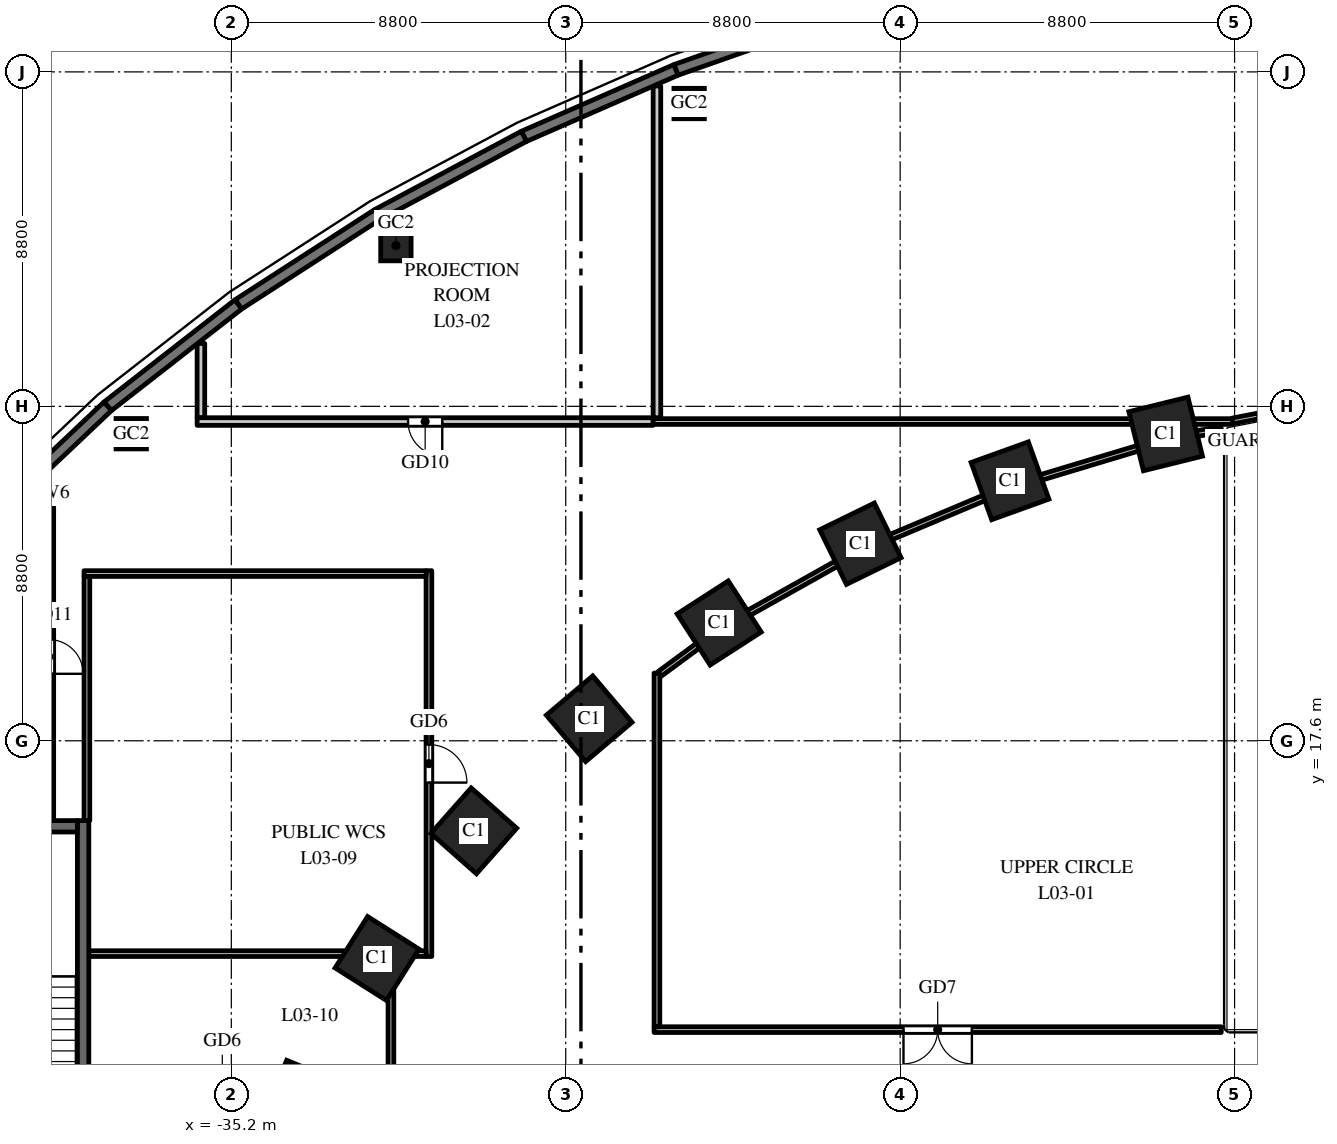
"""IFC4 building model, lengths in metres.
Left out: names, types, materials, properties, quantities, classifications, styles, units other than length and angle.
Written with IfcOpenShell. Run it as: python <this file> out.ifc"""

import sys

from ifc_helpers import new_model, si_unit, direction, frame, frame_2d, origin, origin_2d, place, context, subcontext, project, spatial, rectangle, hollow_rectangle, extrude, element, fill, save


model = new_model("IFC4")
c1 = context("Model", 3, precision=1e-05, world=origin(), true_north=direction((0.0, 1.0)))
c2 = subcontext(c1, "Body", "Model", "MODEL_VIEW")
j1 = project(units=[si_unit("LENGTHUNIT", "METRE"), si_unit("PLANEANGLEUNIT", "RADIAN")], contexts=[c1])
p1 = place(None, origin())
s1 = spatial("IfcSite", under=j1, at=p1, CompositionType="ELEMENT")
p2 = place(p1, origin())
s2 = spatial("IfcBuilding", under=s1, at=p2, CompositionType="ELEMENT")
p3 = place(p2, frame((0.0, 0.0, 19.5)))
s3 = spatial("IfcBuildingStorey", under=s2, at=p3, CompositionType="ELEMENT", Elevation=19.5)
for number, where, z_axis, x_axis in (
    (1, (-10.613, 25.674, 0.0), (0.0, 0.0, 1.0), (-0.971, -0.24, 0.0)),
    (2, (-14.709, 24.441, 0.0), (0.0, 0.0, 1.0), (-0.941, -0.338, 0.0)),
    (3, (-18.646, 22.785, 0.0), (0.0, 0.0, 1.0), (-0.898, -0.439, 0.0)),
    (4, (-22.362, 20.7, 0.0), (0.0, 0.0, 1.0), (-0.84, -0.542, 0.0)),
    (5, (-25.783, 18.18, 0.0), (0.0, 0.0, 1.0), (-0.763, -0.646, 0.0)),
    (6, (-28.819, 15.23, 0.0), (0.0, 0.0, 1.0), (-0.663, -0.749, 0.0)),
    (7, (-31.365, 11.871, 0.0), (0.0, 0.0, 1.0), (-0.535, -0.845, 0.0)),
    (8, (-33.305, 8.149, 0.0), (0.0, 0.0, 1.0), (-0.379, -0.925, 0.0)),
):
    element("IfcColumn", number, at=place(p3, frame(where, z_axis=z_axis, x_axis=x_axis)), inside=s3, PredefinedType="COLUMN", context=c2, shape_type="SweptSolid", body=[
        extrude(rectangle(XDim=1.6, YDim=1.6, at=origin_2d()), origin(), (0.0, 0.0, 1.0), 5.5),
    ])
for number, where, z_axis, x_axis in (
    (9, (-23.153, 34.368, 0.0), (0.0, 0.0, 1.0), (1.0, 0.0, 0.0)),
    (10, (-30.869, 30.629, 0.0), (0.0, 0.0, 1.0), (1.0, 0.0, 0.0)),
    (11, (-37.833, 25.68, 0.0), (0.0, 0.0, 1.0), (1.0, 0.0, 0.0)),
):
    element("IfcColumn", number, at=place(p3, frame(where, z_axis=z_axis, x_axis=x_axis)), inside=s3, PredefinedType="COLUMN", context=c2, shape_type="SweptSolid", body=[
        extrude(hollow_rectangle(XDim=0.8, YDim=0.8, WallThickness=0.04, at=origin_2d()), origin(), (0.0, 0.0, 1.0), 5.5),
    ])
p4 = place(p3, frame((-22.346, 20.537, 0.0), z_axis=(0.0, 0.0, 1.0), x_axis=(0.872066959566, 0.489386573204, 0.0)))
e12 = element("IfcWall", 12, at=p4, inside=s3, PredefinedType="PARTITIONING", context=c2, shape_type="SweptSolid", body=[
    extrude(rectangle(XDim=4.242, YDim=0.15, at=frame_2d((2.121, 0.0))), origin(), (0.0, 0.0, 1.0), 4.35),
])
p5 = place(p3, frame((-18.649, 22.621, 0.0), z_axis=(0.0, 0.0, 1.0), x_axis=(0.921813560734, 0.387633537309, 0.0)))
e13 = element("IfcWall", 13, at=p5, inside=s3, PredefinedType="PARTITIONING", context=c2, shape_type="SweptSolid", body=[
    extrude(rectangle(XDim=4.253, YDim=0.15, at=frame_2d((2.126, 0.0))), origin(), (0.0, 0.0, 1.0), 4.35),
])
p6 = place(p3, frame((-14.73, 24.278, 0.0), z_axis=(0.0, 0.0, 1.0), x_axis=(0.957579221601, 0.288170148278, 0.0)))
e14 = element("IfcWall", 14, at=p6, inside=s3, PredefinedType="PARTITIONING", context=c2, shape_type="SweptSolid", body=[
    extrude(rectangle(XDim=4.412, YDim=0.15, at=frame_2d((2.206, 0.0))), origin(), (0.0, 0.0, 1.0), 4.35),
])
p7 = place(p3, frame((-10.503, 25.542, 0.0), z_axis=(0.0, 0.0, 1.0), x_axis=(0.981596023088, 0.190969231707, 0.0)))
e15 = element("IfcWall", 15, at=p7, inside=s3, PredefinedType="PARTITIONING", context=c2, shape_type="SweptSolid", body=[
    extrude(rectangle(XDim=1.378, YDim=0.15, at=frame_2d((0.689, 0.0))), origin(), (0.0, 0.0, 1.0), 4.35),
])
p8 = place(p3, frame((-9.15, 10.0, 0.0), z_axis=(0.0, 0.0, 1.0), x_axis=(-1.0, 0.0, 0.0)))
e16 = element("IfcWall", 16, at=p8, inside=s3, PredefinedType="PARTITIONING", context=c2, shape_type="SweptSolid", body=[
    extrude(rectangle(XDim=14.925, YDim=0.15, at=frame_2d((7.462, 0.0))), origin(), (0.0, 0.0, 1.0), 4.2),
])
p9 = place(p8, frame((6.562, 0.0, 0.0)))
e17 = element("IfcOpeningElement", 17, at=p9, cuts=e16, PredefinedType="OPENING", context=c2, shape_type="SweptSolid", body=[
    extrude(rectangle(XDim=1.8, YDim=2.4, at=frame_2d((0.9, 1.2))), frame((0.0, 0.085, 0.0), z_axis=(0.0, -1.0, 0.0), x_axis=(1.0, 0.0, 0.0)), (0.0, 0.0, 1.0), 0.17),
])
p10 = place(p3, frame((-24.0, 10.075, 0.0), z_axis=(0.0, 0.0, 1.0), x_axis=(0.0, 1.0, 0.0)))
e18 = element("IfcWall", 18, at=p10, inside=s3, PredefinedType="PARTITIONING", context=c2, shape_type="SweptSolid", body=[
    extrude(rectangle(XDim=9.307, YDim=0.15, at=frame_2d((4.654, 0.0))), origin(), (0.0, 0.0, 1.0), 4.2),
])
p11 = place(p3, frame((-23.927, 19.361, 0.0), z_axis=(0.0, 0.0, 1.0), x_axis=(0.805121312462, 0.593110168703, 0.0)))
e19 = element("IfcWall", 19, at=p11, inside=s3, PredefinedType="PARTITIONING", context=c2, shape_type="SweptSolid", body=[
    extrude(rectangle(XDim=1.968, YDim=0.15, at=frame_2d((0.984, 0.0))), origin(), (0.0, 0.0, 1.0), 4.35),
])
p12 = place(p3, frame((-24.0, 34.83, 0.0), z_axis=(0.0, 0.0, 1.0), x_axis=(0.0, -1.0, 0.0)))
e20 = element("IfcWall", 20, at=p12, inside=s3, PredefinedType="PARTITIONING", context=c2, shape_type="SweptSolid", body=[
    extrude(rectangle(XDim=8.73, YDim=0.2, at=frame_2d((4.365, 0.0))), origin(), (0.0, 0.0, 1.0), 4.65),
])
p13 = place(p3, frame((-36.0, 26.1, 0.0), z_axis=(0.0, 0.0, 1.0), x_axis=(0.0, 1.0, 0.0)))
e21 = element("IfcWall", 21, at=p13, inside=s3, PredefinedType="PARTITIONING", context=c2, shape_type="SweptSolid", body=[
    extrude(rectangle(XDim=1.954, YDim=0.2, at=frame_2d((0.977, 0.0))), origin(), (0.0, 0.0, 1.0), 4.65),
])
p14 = place(p3, frame((-24.099, 26.0, 0.0), z_axis=(0.0, 0.0, 1.0), x_axis=(-1.0, 0.0, 0.0)))
e22 = element("IfcWall", 22, at=p14, inside=s3, PredefinedType="PARTITIONING", context=c2, shape_type="SweptSolid", body=[
    extrude(rectangle(XDim=12.001, YDim=0.2, at=frame_2d((6.001, 0.0))), origin(), (0.0, 0.0, 1.0), 4.25),
])
p15 = place(p14, frame((5.551, 0.0, 0.0)))
e23 = element("IfcOpeningElement", 23, at=p15, cuts=e22, PredefinedType="OPENING", context=c2, shape_type="SweptSolid", body=[
    extrude(rectangle(XDim=0.9, YDim=2.1, at=frame_2d((0.45, 1.05))), frame((0.0, 0.11, 0.0), z_axis=(0.0, -1.0, 0.0), x_axis=(1.0, 0.0, 0.0)), (0.0, 0.0, 1.0), 0.22),
])
p16 = place(p3, frame((-8.163, 26.15, 0.0), z_axis=(0.0, 0.0, 1.0), x_axis=(-0.981654917387, -0.190666261224, 0.0)))
e24 = element("IfcWall", 24, at=p16, inside=s3, PredefinedType="PARTITIONING", context=c2, shape_type="SweptSolid", body=[
    extrude(rectangle(XDim=0.707, YDim=0.15, at=frame_2d((0.354, 0.0))), origin(), (0.0, 0.0, 1.0), 4.35),
])
p17 = place(p3, frame((-8.859, 26.0, 0.0), z_axis=(0.0, 0.0, 1.0), x_axis=(-1.0, 0.0, 0.0)))
e25 = element("IfcWall", 25, at=p17, inside=s3, PredefinedType="PARTITIONING", context=c2, shape_type="SweptSolid", body=[
    extrude(rectangle(XDim=15.241, YDim=0.15, at=frame_2d((7.621, 0.0))), origin(), (0.0, 0.0, 1.0), 4.25),
])
p18 = place(p3, frame((-40.0, 24.125, 0.0), z_axis=(0.0, 0.0, 1.0), x_axis=(0.0, -1.0, 0.0)))
e26 = element("IfcWall", 26, at=p18, inside=s3, PredefinedType="PARTITIONING", context=c2, shape_type="SweptSolid", body=[
    extrude(rectangle(XDim=8.625, YDim=0.25, at=frame_2d((4.312, 0.0))), origin(), (0.0, 0.0, 1.0), 4.25),
])
p19 = place(p18, frame((3.863, 0.0, 0.0)))
e27 = element("IfcOpeningElement", 27, at=p19, cuts=e26, PredefinedType="OPENING", context=c2, shape_type="SweptSolid", body=[
    extrude(rectangle(XDim=0.9, YDim=2.1, at=frame_2d((0.45, 1.05))), frame((0.0, 0.135, 0.0), z_axis=(0.0, -1.0, 0.0), x_axis=(1.0, 0.0, 0.0)), (0.0, 0.0, 1.0), 0.27),
])
p20 = place(p3, frame((-31.065, 12.0, 0.0), z_axis=(0.0, 0.0, 1.0), x_axis=(-1.0, 0.0, 0.0)))
e28 = element("IfcWall", 28, at=p20, inside=s3, PredefinedType="PARTITIONING", context=c2, shape_type="SweptSolid", body=[
    extrude(rectangle(XDim=7.885, YDim=0.15, at=frame_2d((3.942, 0.0))), origin(), (0.0, 0.0, 1.0), 5.25),
])
p21 = place(p3, frame((-30.0, 22.075, 0.0), z_axis=(0.0, 0.0, 1.0), x_axis=(0.0, -1.0, 0.0)))
e29 = element("IfcWall", 29, at=p21, inside=s3, PredefinedType="PARTITIONING", context=c2, shape_type="SweptSolid", body=[
    extrude(rectangle(XDim=10.15, YDim=0.15, at=frame_2d((5.075, 0.0))), origin(), (0.0, 0.0, 1.0), 4.25),
])
p22 = place(p21, frame((4.575, 0.0, 0.0)))
e30 = element("IfcOpeningElement", 30, at=p22, cuts=e29, PredefinedType="OPENING", context=c2, shape_type="SweptSolid", body=[
    extrude(rectangle(XDim=1.0, YDim=2.1, at=frame_2d((0.5, 1.05))), frame((0.0, 0.085, 0.0), z_axis=(0.0, -1.0, 0.0), x_axis=(1.0, 0.0, 0.0)), (0.0, 0.0, 1.0), 0.17),
])
p23 = place(p3, frame((-30.075, 12.0, 0.0), z_axis=(0.0, 0.0, 1.0), x_axis=(-1.0, 0.0, 0.0)))
e31 = element("IfcWall", 31, at=p23, inside=s3, PredefinedType="PARTITIONING", context=c2, shape_type="SweptSolid", body=[
    extrude(rectangle(XDim=0.86, YDim=0.15, at=frame_2d((0.43, 0.0))), origin(), (0.0, 0.0, 1.0), 5.25),
])
p24 = place(p3, frame((-39.0, 15.5, 0.0), z_axis=(0.0, 0.0, 1.0), x_axis=(0.0, 1.0, 0.0)))
e32 = element("IfcWall", 32, at=p24, inside=s3, PredefinedType="PARTITIONING", context=c2, shape_type="SweptSolid", body=[
    extrude(rectangle(XDim=6.425, YDim=0.15, at=frame_2d((3.212, 0.0))), origin(), (0.0, 0.0, 1.0), 4.25),
])
p25 = place(p3, frame((-39.075, 22.0, 0.0), z_axis=(0.0, 0.0, 1.0), x_axis=(1.0, 0.0, 0.0)))
e33 = element("IfcWall", 33, at=p25, inside=s3, PredefinedType="PARTITIONING", context=c2, shape_type="SweptSolid", body=[
    extrude(rectangle(XDim=9.0, YDim=0.15, at=frame_2d((4.5, 0.0))), origin(), (0.0, 0.0, 1.0), 4.25),
])
p26 = place(p3, frame((-31.0, 11.925, 0.0), z_axis=(0.0, 0.0, 1.0), x_axis=(0.0, -1.0, 0.0)))
e34 = element("IfcWall", 34, at=p26, inside=s3, PredefinedType="PARTITIONING", context=c2, shape_type="SweptSolid", body=[
    extrude(rectangle(XDim=3.25, YDim=0.15, at=frame_2d((1.625, 0.0))), origin(), (0.0, 0.0, 1.0), 5.25),
])
p27 = place(p3, frame((-19.379, 36.699, 0.0), z_axis=(0.0, 0.0, 1.0), x_axis=(-0.943526738033, -0.331296384853, 0.0)))
e35 = element("IfcWall", 35, at=p27, inside=s3, PredefinedType="SOLIDWALL", context=c2, shape_type="SweptSolid", body=[
    extrude(rectangle(XDim=4.368, YDim=0.3, at=frame_2d((2.184, 0.0))), origin(), (0.0, 0.0, 1.0), 5.25),
])
p28 = place(p27, frame((0.984, 0.0, 1.0)))
e36 = element("IfcOpeningElement", 36, at=p28, cuts=e35, PredefinedType="OPENING", context=c2, shape_type="SweptSolid", body=[
    extrude(rectangle(XDim=2.4, YDim=3.0, at=frame_2d((1.2, 1.5))), frame((0.0, 0.16, 0.0), z_axis=(0.0, -1.0, 0.0), x_axis=(1.0, 0.0, 0.0)), (0.0, 0.0, 1.0), 0.32),
])
p29 = place(p3, frame((-23.5, 35.252, 0.0), z_axis=(0.0, 0.0, 1.0), x_axis=(-0.916336904548, -0.400408138483, 0.0)))
e37 = element("IfcWall", 37, at=p29, inside=s3, PredefinedType="SOLIDWALL", context=c2, shape_type="SweptSolid", body=[
    extrude(rectangle(XDim=4.366, YDim=0.3, at=frame_2d((2.183, 0.0))), origin(), (0.0, 0.0, 1.0), 5.25),
])
p30 = place(p29, frame((0.983, 0.0, 1.0)))
e38 = element("IfcOpeningElement", 38, at=p30, cuts=e37, PredefinedType="OPENING", context=c2, shape_type="SweptSolid", body=[
    extrude(rectangle(XDim=2.4, YDim=3.0, at=frame_2d((1.2, 1.5))), frame((0.0, 0.16, 0.0), z_axis=(0.0, -1.0, 0.0), x_axis=(1.0, 0.0, 0.0)), (0.0, 0.0, 1.0), 0.32),
])
p31 = place(p3, frame((-27.501, 33.504, 0.0), z_axis=(0.0, 0.0, 1.0), x_axis=(-0.882159305704, -0.47095112205, 0.0)))
e39 = element("IfcWall", 39, at=p31, inside=s3, PredefinedType="SOLIDWALL", context=c2, shape_type="SweptSolid", body=[
    extrude(rectangle(XDim=4.365, YDim=0.3, at=frame_2d((2.182, 0.0))), origin(), (0.0, 0.0, 1.0), 5.25),
])
p32 = place(p31, frame((0.982, 0.0, 1.0)))
e40 = element("IfcOpeningElement", 40, at=p32, cuts=e39, PredefinedType="OPENING", context=c2, shape_type="SweptSolid", body=[
    extrude(rectangle(XDim=2.4, YDim=3.0, at=frame_2d((1.2, 1.5))), frame((0.0, 0.16, 0.0), z_axis=(0.0, -1.0, 0.0), x_axis=(1.0, 0.0, 0.0)), (0.0, 0.0, 1.0), 0.32),
])
p33 = place(p3, frame((-31.352, 31.448, 0.0), z_axis=(0.0, 0.0, 1.0), x_axis=(-0.840047348843, -0.542513088969, 0.0)))
e41 = element("IfcWall", 41, at=p33, inside=s3, PredefinedType="SOLIDWALL", context=c2, shape_type="SweptSolid", body=[
    extrude(rectangle(XDim=4.362, YDim=0.3, at=frame_2d((2.181, 0.0))), origin(), (0.0, 0.0, 1.0), 5.25),
])
p34 = place(p33, frame((0.981, 0.0, 1.0)))
e42 = element("IfcOpeningElement", 42, at=p34, cuts=e41, PredefinedType="OPENING", context=c2, shape_type="SweptSolid", body=[
    extrude(rectangle(XDim=2.4, YDim=3.0, at=frame_2d((1.2, 1.5))), frame((0.0, 0.16, 0.0), z_axis=(0.0, -1.0, 0.0), x_axis=(1.0, 0.0, 0.0)), (0.0, 0.0, 1.0), 0.32),
])
p35 = place(p3, frame((-35.016, 29.082, 0.0), z_axis=(0.0, 0.0, 1.0), x_axis=(-0.788491985196, -0.615045030288, 0.0)))
e43 = element("IfcWall", 43, at=p35, inside=s3, PredefinedType="SOLIDWALL", context=c2, shape_type="SweptSolid", body=[
    extrude(rectangle(XDim=4.359, YDim=0.3, at=frame_2d((2.18, 0.0))), origin(), (0.0, 0.0, 1.0), 5.25),
])
p36 = place(p35, frame((1.61, 0.0, 1.0)))
e44 = element("IfcOpeningElement", 44, at=p36, cuts=e43, PredefinedType="OPENING", context=c2, shape_type="SweptSolid", body=[
    extrude(rectangle(XDim=2.4, YDim=3.0, at=frame_2d((1.2, 1.5))), frame((0.0, 0.16, 0.0), z_axis=(0.0, -1.0, 0.0), x_axis=(1.0, 0.0, 0.0)), (0.0, 0.0, 1.0), 0.32),
])
p37 = place(p3, frame((-38.453, 26.401, 0.0), z_axis=(0.0, 0.0, 1.0), x_axis=(-0.72620446032, -0.687478786444, 0.0)))
e45 = element("IfcWall", 45, at=p37, inside=s3, PredefinedType="SOLIDWALL", context=c2, shape_type="SweptSolid", body=[
    extrude(rectangle(XDim=4.356, YDim=0.3, at=frame_2d((2.178, 0.0))), origin(), (0.0, 0.0, 1.0), 5.25),
])
p38 = place(p37, frame((0.608, 0.0, 1.0)))
e46 = element("IfcOpeningElement", 46, at=p38, cuts=e45, PredefinedType="OPENING", context=c2, shape_type="SweptSolid", body=[
    extrude(rectangle(XDim=2.4, YDim=3.0, at=frame_2d((1.2, 1.5))), frame((0.0, 0.16, 0.0), z_axis=(0.0, -1.0, 0.0), x_axis=(1.0, 0.0, 0.0)), (0.0, 0.0, 1.0), 0.32),
])
p39 = place(p3, frame((-39.1, 4.5, 0.0), z_axis=(0.0, 0.0, 1.0), x_axis=(0.0, 1.0, 0.0)))
e47 = element("IfcWall", 47, at=p39, inside=s3, PredefinedType="SHEAR", context=c2, shape_type="SweptSolid", body=[
    extrude(rectangle(XDim=11.0, YDim=0.3, at=frame_2d((5.5, 0.0))), origin(), (0.0, 0.0, 1.0), 5.25),
])
p40 = place(p3, frame((-44.2, 15.35, 0.0), z_axis=(0.0, 0.0, 1.0), x_axis=(1.0, 0.0, 0.0)))
e48 = element("IfcWall", 48, at=p40, inside=s3, PredefinedType="SHEAR", context=c2, shape_type="SweptSolid", body=[
    extrude(rectangle(XDim=4.95, YDim=0.3, at=frame_2d((2.475, 0.0))), origin(), (0.0, 0.0, 1.0), 5.25),
])
p41 = place(p9, origin())
e49 = element("IfcDoor", 49, at=p41, inside=s3, OperationType="DOUBLE_DOOR_SINGLE_SWING", PredefinedType="DOOR", context=c2, shape_type="SweptSolid", body=[
    extrude(rectangle(XDim=1.8, YDim=2.4, at=frame_2d((0.9, 1.2))), frame((0.0, 0.025, 0.0), z_axis=(0.0, -1.0, 0.0), x_axis=(1.0, 0.0, 0.0)), (0.0, 0.0, 1.0), 0.05),
])
fill(e17, e49)
p42 = place(p15, origin())
e50 = element("IfcDoor", 50, at=p42, inside=s3, OperationType="SINGLE_SWING_LEFT", PredefinedType="DOOR", context=c2, shape_type="SweptSolid", body=[
    extrude(rectangle(XDim=0.9, YDim=2.1, at=frame_2d((0.45, 1.05))), frame((0.0, 0.025, 0.0), z_axis=(0.0, -1.0, 0.0), x_axis=(1.0, 0.0, 0.0)), (0.0, 0.0, 1.0), 0.05),
])
fill(e23, e50)
p43 = place(p22, origin())
e51 = element("IfcDoor", 51, at=p43, inside=s3, OperationType="SINGLE_SWING_RIGHT", PredefinedType="DOOR", context=c2, shape_type="SweptSolid", body=[
    extrude(rectangle(XDim=1.0, YDim=2.1, at=frame_2d((0.5, 1.05))), frame((0.0, 0.025, 0.0), z_axis=(0.0, -1.0, 0.0), x_axis=(1.0, 0.0, 0.0)), (0.0, 0.0, 1.0), 0.05),
])
fill(e30, e51)
p44 = place(p28, origin())
e52 = element("IfcWindow", 52, at=p44, inside=s3, PartitioningType="SINGLE_PANEL", PredefinedType="WINDOW", context=c2, shape_type="SweptSolid", body=[
    extrude(rectangle(XDim=2.4, YDim=3.0, at=frame_2d((1.2, 1.5))), frame((0.0, 0.03, 0.0), z_axis=(0.0, -1.0, 0.0), x_axis=(1.0, 0.0, 0.0)), (0.0, 0.0, 1.0), 0.06),
])
fill(e36, e52)
p45 = place(p30, origin())
e53 = element("IfcWindow", 53, at=p45, inside=s3, PartitioningType="SINGLE_PANEL", PredefinedType="WINDOW", context=c2, shape_type="SweptSolid", body=[
    extrude(rectangle(XDim=2.4, YDim=3.0, at=frame_2d((1.2, 1.5))), frame((0.0, 0.03, 0.0), z_axis=(0.0, -1.0, 0.0), x_axis=(1.0, 0.0, 0.0)), (0.0, 0.0, 1.0), 0.06),
])
fill(e38, e53)
p46 = place(p32, origin())
e54 = element("IfcWindow", 54, at=p46, inside=s3, PartitioningType="SINGLE_PANEL", PredefinedType="WINDOW", context=c2, shape_type="SweptSolid", body=[
    extrude(rectangle(XDim=2.4, YDim=3.0, at=frame_2d((1.2, 1.5))), frame((0.0, 0.03, 0.0), z_axis=(0.0, -1.0, 0.0), x_axis=(1.0, 0.0, 0.0)), (0.0, 0.0, 1.0), 0.06),
])
fill(e40, e54)
p47 = place(p34, origin())
e55 = element("IfcWindow", 55, at=p47, inside=s3, PartitioningType="SINGLE_PANEL", PredefinedType="WINDOW", context=c2, shape_type="SweptSolid", body=[
    extrude(rectangle(XDim=2.4, YDim=3.0, at=frame_2d((1.2, 1.5))), frame((0.0, 0.03, 0.0), z_axis=(0.0, -1.0, 0.0), x_axis=(1.0, 0.0, 0.0)), (0.0, 0.0, 1.0), 0.06),
])
fill(e42, e55)
p48 = place(p36, origin())
e56 = element("IfcWindow", 56, at=p48, inside=s3, PartitioningType="SINGLE_PANEL", PredefinedType="WINDOW", context=c2, shape_type="SweptSolid", body=[
    extrude(rectangle(XDim=2.4, YDim=3.0, at=frame_2d((1.2, 1.5))), frame((0.0, 0.03, 0.0), z_axis=(0.0, -1.0, 0.0), x_axis=(1.0, 0.0, 0.0)), (0.0, 0.0, 1.0), 0.06),
])
fill(e44, e56)
p49 = place(p38, origin())
e57 = element("IfcWindow", 57, at=p49, inside=s3, PartitioningType="SINGLE_PANEL", PredefinedType="WINDOW", context=c2, shape_type="SweptSolid", body=[
    extrude(rectangle(XDim=2.4, YDim=3.0, at=frame_2d((1.2, 1.5))), frame((0.0, 0.03, 0.0), z_axis=(0.0, -1.0, 0.0), x_axis=(1.0, 0.0, 0.0)), (0.0, 0.0, 1.0), 0.06),
])
fill(e46, e57)
save(model, sys.argv[1])
